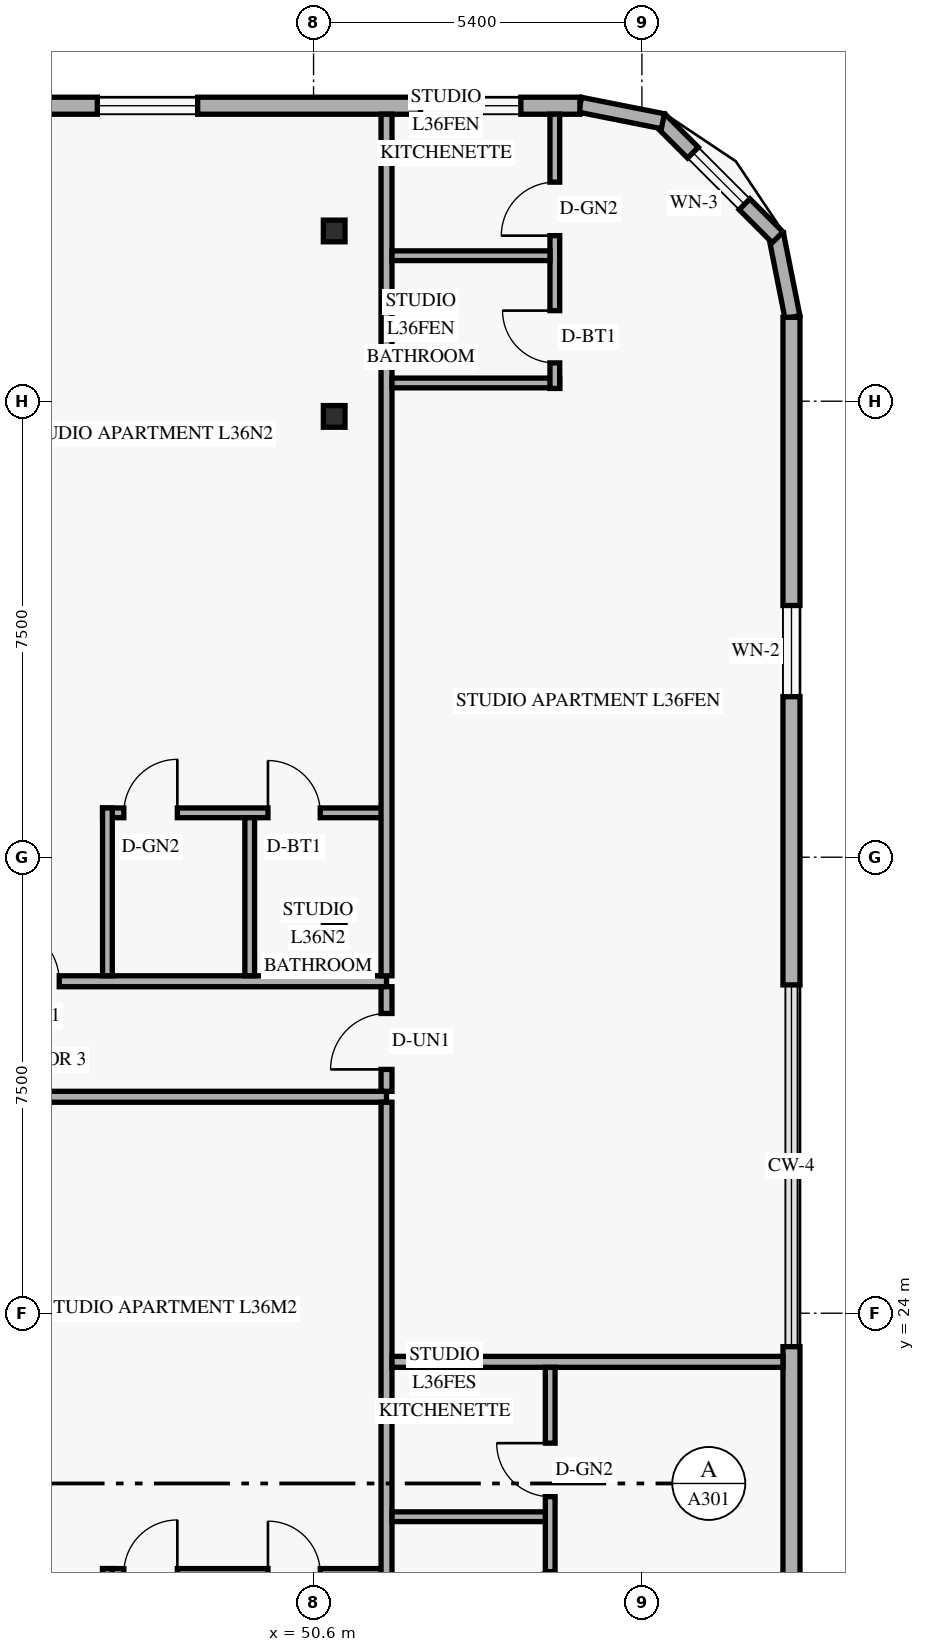
"""IFC4 building model, lengths in metres.
Left out: names, types, materials, properties, quantities, classifications, styles, units other than length and angle.
Written with IfcOpenShell. Run it as: python <this file> out.ifc"""

import sys

from ifc_helpers import new_model, si_unit, direction, frame, frame_2d, origin, origin_2d, place, context, subcontext, project, spatial, rectangle, hollow_rectangle, extrude, element, fill, save


model = new_model("IFC4")
c1 = context("Model", 3, precision=1e-05, world=origin(), true_north=direction((0.0, 1.0)))
c2 = subcontext(c1, "Body", "Model", "MODEL_VIEW")
j1 = project(units=[si_unit("LENGTHUNIT", "METRE"), si_unit("PLANEANGLEUNIT", "RADIAN")], contexts=[c1])
p1 = place(None, origin())
s1 = spatial("IfcSite", under=j1, at=p1, CompositionType="ELEMENT")
p2 = place(p1, origin())
s2 = spatial("IfcBuilding", under=s1, at=p2, CompositionType="ELEMENT")
p3 = place(p2, frame((0.0, 0.0, 141.0)))
s3 = spatial("IfcBuildingStorey", under=s2, at=p3, CompositionType="ELEMENT", Elevation=141.0)
for number, where, z_axis, x_axis in (
    (1, (50.835, 30.2, 0.0), (0.058, 0.0, 0.998), (0.0, 1.0, 0.0)),
    (2, (50.835, 38.75, 0.0), (0.058, 0.0, 0.998), (0.0, 1.0, 0.0)),
    (3, (50.835, 41.8, 0.0), (0.058, 0.0, 0.998), (0.0, 1.0, 0.0)),
):
    element("IfcColumn", number, at=place(p3, frame(where, z_axis=z_axis, x_axis=x_axis)), inside=s3, PredefinedType="COLUMN", context=c2, shape_type="SweptSolid", body=[
        extrude(hollow_rectangle(XDim=0.356, YDim=0.356, WallThickness=0.016, at=origin_2d()), origin(), (0.0, 0.0, 1.0), 3.606),
    ])
p4 = place(p3, frame((58.476, 40.384, 0.0), z_axis=(0.0, 0.0, 1.0), x_axis=(-0.19496651342, 0.980809899341, 0.0)))
e4 = element("IfcWall", 4, at=p4, inside=s3, PredefinedType="SOLIDWALL", context=c2, shape_type="SweptSolid", body=[
    extrude(rectangle(XDim=1.389, YDim=0.25, at=frame_2d((0.694, 0.0))), origin(), (0.0, 0.0, 1.0), 3.36),
])
p5 = place(p3, frame((58.232, 41.695, 0.0), z_axis=(0.0, 0.0, 1.0), x_axis=(-0.707106781187, 0.707106781187, 0.0)))
e5 = element("IfcWall", 5, at=p5, inside=s3, PredefinedType="SOLIDWALL", context=c2, shape_type="SweptSolid", body=[
    extrude(rectangle(XDim=2.739, YDim=0.25, at=frame_2d((1.37, 0.0))), origin(), (0.0, 0.0, 1.0), 3.36),
])
p6 = place(p5, frame((0.77, 0.0, 0.85)))
e6 = element("IfcOpeningElement", 6, at=p6, cuts=e5, PredefinedType="OPENING", context=c2, shape_type="SweptSolid", body=[
    extrude(rectangle(XDim=1.2, YDim=1.5, at=frame_2d((0.6, 0.75))), frame((0.0, 0.135, 0.0), z_axis=(0.0, -1.0, 0.0), x_axis=(1.0, 0.0, 0.0)), (0.0, 0.0, 1.0), 0.27),
])
p7 = place(p3, frame((56.345, 43.605, 0.0), z_axis=(0.0, 0.0, 1.0), x_axis=(-0.980809899341, 0.19496651342, 0.0)))
e7 = element("IfcWall", 7, at=p7, inside=s3, PredefinedType="SOLIDWALL", context=c2, shape_type="SweptSolid", body=[
    extrude(rectangle(XDim=1.389, YDim=0.25, at=frame_2d((0.694, 0.0))), origin(), (0.0, 0.0, 1.0), 3.36),
])
p8 = place(p3, frame((58.46, 7.62, 0.0), z_axis=(0.0, 0.0, 1.0), x_axis=(0.0, 1.0, 0.0)))
e8 = element("IfcWall", 8, at=p8, inside=s3, PredefinedType="SOLIDWALL", context=c2, shape_type="SweptSolid", body=[
    extrude(rectangle(XDim=15.83, YDim=0.28, at=frame_2d((7.915, 0.0))), origin(), (0.0, 0.0, 1.0), 3.36),
])
p9 = place(p8, frame((7.165, 0.0, 0.85)))
e9 = element("IfcOpeningElement", 9, at=p9, cuts=e8, PredefinedType="OPENING", context=c2, shape_type="SweptSolid", body=[
    extrude(rectangle(XDim=1.5, YDim=1.55, at=frame_2d((0.75, 0.775))), frame((0.0, 0.15, 0.0), z_axis=(0.0, -1.0, 0.0), x_axis=(1.0, 0.0, 0.0)), (0.0, 0.0, 1.0), 0.3),
])
p10 = place(p3, frame((58.46, 29.4, 0.0), z_axis=(0.0, 0.0, 1.0), x_axis=(0.0, 1.0, 0.0)))
e10 = element("IfcWall", 10, at=p10, inside=s3, PredefinedType="SOLIDWALL", context=c2, shape_type="SweptSolid", body=[
    extrude(rectangle(XDim=10.98, YDim=0.28, at=frame_2d((5.49, 0.0))), origin(), (0.0, 0.0, 1.0), 3.36),
])
p11 = place(p10, frame((4.74, 0.0, 0.85)))
e11 = element("IfcOpeningElement", 11, at=p11, cuts=e10, PredefinedType="OPENING", context=c2, shape_type="SweptSolid", body=[
    extrude(rectangle(XDim=1.5, YDim=1.55, at=frame_2d((0.75, 0.775))), frame((0.0, 0.15, 0.0), z_axis=(0.0, -1.0, 0.0), x_axis=(1.0, 0.0, 0.0)), (0.0, 0.0, 1.0), 0.3),
])
p12 = place(p3, frame((54.98, 43.86, 0.0), z_axis=(0.0, 0.0, 1.0), x_axis=(-1.0, 0.0, 0.0)))
e12 = element("IfcWall", 12, at=p12, inside=s3, PredefinedType="SOLIDWALL", context=c2, shape_type="SweptSolid", body=[
    extrude(rectangle(XDim=33.76, YDim=0.28, at=frame_2d((16.88, 0.0))), origin(), (0.0, 0.0, 1.0), 3.36),
])
p13 = place(p12, frame((28.555, 0.0, 0.85)))
e13 = element("IfcOpeningElement", 13, at=p13, cuts=e12, PredefinedType="OPENING", context=c2, shape_type="SweptSolid", body=[
    extrude(rectangle(XDim=1.65, YDim=1.6, at=frame_2d((0.825, 0.8))), frame((0.0, 0.15, 0.0), z_axis=(0.0, -1.0, 0.0), x_axis=(1.0, 0.0, 0.0)), (0.0, 0.0, 1.0), 0.3),
])
p14 = place(p12, frame((21.67, 0.0, 0.85)))
e14 = element("IfcOpeningElement", 14, at=p14, cuts=e12, PredefinedType="OPENING", context=c2, shape_type="SweptSolid", body=[
    extrude(rectangle(XDim=1.65, YDim=1.6, at=frame_2d((0.825, 0.8))), frame((0.0, 0.15, 0.0), z_axis=(0.0, -1.0, 0.0), x_axis=(1.0, 0.0, 0.0)), (0.0, 0.0, 1.0), 0.3),
])
p15 = place(p12, frame((14.476, 0.0, 0.85)))
e15 = element("IfcOpeningElement", 15, at=p15, cuts=e12, PredefinedType="OPENING", context=c2, shape_type="SweptSolid", body=[
    extrude(rectangle(XDim=1.65, YDim=1.6, at=frame_2d((0.825, 0.8))), frame((0.0, 0.15, 0.0), z_axis=(0.0, -1.0, 0.0), x_axis=(1.0, 0.0, 0.0)), (0.0, 0.0, 1.0), 0.3),
])
p16 = place(p12, frame((6.286, 0.0, 0.85)))
e16 = element("IfcOpeningElement", 16, at=p16, cuts=e12, PredefinedType="OPENING", context=c2, shape_type="SweptSolid", body=[
    extrude(rectangle(XDim=1.65, YDim=1.6, at=frame_2d((0.825, 0.8))), frame((0.0, 0.15, 0.0), z_axis=(0.0, -1.0, 0.0), x_axis=(1.0, 0.0, 0.0)), (0.0, 0.0, 1.0), 0.3),
])
p17 = place(p12, frame((0.971, 0.0, 0.85)))
e17 = element("IfcOpeningElement", 17, at=p17, cuts=e12, PredefinedType="OPENING", context=c2, shape_type="SweptSolid", body=[
    extrude(rectangle(XDim=1.65, YDim=1.6, at=frame_2d((0.825, 0.8))), frame((0.0, 0.15, 0.0), z_axis=(0.0, -1.0, 0.0), x_axis=(1.0, 0.0, 0.0)), (0.0, 0.0, 1.0), 0.3),
])
p18 = place(p3, frame((37.64, 27.56, 0.0), z_axis=(0.0, 0.0, 1.0), x_axis=(1.0, 0.0, 0.0)))
e18 = element("IfcWall", 18, at=p18, inside=s3, PredefinedType="STANDARD", context=c2, shape_type="SweptSolid", body=[
    extrude(rectangle(XDim=14.16, YDim=0.18, at=frame_2d((7.08, 0.0))), origin(), (0.0, 0.0, 1.0), 2.73),
])
p19 = place(p3, frame((35.51, 29.46, 0.0), z_axis=(0.0, 0.0, 1.0), x_axis=(1.0, 0.0, 0.0)))
e19 = element("IfcWall", 19, at=p19, inside=s3, PredefinedType="STANDARD", context=c2, shape_type="SweptSolid", body=[
    extrude(rectangle(XDim=16.29, YDim=0.18, at=frame_2d((8.145, 0.0))), origin(), (0.0, 0.0, 1.0), 2.73),
])
p20 = place(p19, frame((0.35, 0.0, 0.0)))
e20 = element("IfcOpeningElement", 20, at=p20, cuts=e19, PredefinedType="OPENING", context=c2, shape_type="SweptSolid", body=[
    extrude(rectangle(XDim=0.92, YDim=2.15, at=frame_2d((0.46, 1.075))), frame((0.0, 0.1, 0.0), z_axis=(0.0, -1.0, 0.0), x_axis=(1.0, 0.0, 0.0)), (0.0, 0.0, 1.0), 0.2),
])
p21 = place(p19, frame((9.988, 0.0, 0.0)))
e21 = element("IfcOpeningElement", 21, at=p21, cuts=e19, PredefinedType="OPENING", context=c2, shape_type="SweptSolid", body=[
    extrude(rectangle(XDim=0.92, YDim=2.15, at=frame_2d((0.46, 1.075))), frame((0.0, 0.1, 0.0), z_axis=(0.0, -1.0, 0.0), x_axis=(1.0, 0.0, 0.0)), (0.0, 0.0, 1.0), 0.2),
])
p22 = place(p3, frame((47.13, 32.23, 0.0), z_axis=(0.0, 0.0, 1.0), x_axis=(1.0, 0.0, 0.0)))
e22 = element("IfcWall", 22, at=p22, inside=s3, PredefinedType="PLUMBINGWALL", context=c2, shape_type="SweptSolid", body=[
    extrude(rectangle(XDim=4.67, YDim=0.16, at=frame_2d((2.335, 0.0))), origin(), (0.0, 0.0, 1.0), 2.879),
])
p23 = place(p22, frame((0.35, 0.0, 0.0)))
e23 = element("IfcOpeningElement", 23, at=p23, cuts=e22, PredefinedType="OPENING", context=c2, shape_type="SweptSolid", body=[
    extrude(rectangle(XDim=0.88, YDim=2.12, at=frame_2d((0.44, 1.06))), frame((0.0, 0.09, 0.0), z_axis=(0.0, -1.0, 0.0), x_axis=(1.0, 0.0, 0.0)), (0.0, 0.0, 1.0), 0.18),
])
p24 = place(p22, frame((2.72, 0.0, 0.0)))
e24 = element("IfcOpeningElement", 24, at=p24, cuts=e22, PredefinedType="OPENING", context=c2, shape_type="SweptSolid", body=[
    extrude(rectangle(XDim=0.86, YDim=2.12, at=frame_2d((0.43, 1.06))), frame((0.0, 0.09, 0.0), z_axis=(0.0, -1.0, 0.0), x_axis=(1.0, 0.0, 0.0)), (0.0, 0.0, 1.0), 0.18),
])
p25 = place(p3, frame((47.21, 29.55, 0.0), z_axis=(0.0, 0.0, 1.0), x_axis=(0.0, 1.0, 0.0)))
e25 = element("IfcWall", 25, at=p25, inside=s3, PredefinedType="PLUMBINGWALL", context=c2, shape_type="SweptSolid", body=[
    extrude(rectangle(XDim=2.76, YDim=0.16, at=frame_2d((1.38, 0.0))), origin(), (0.0, 0.0, 1.0), 2.73),
])
p26 = place(p3, frame((49.55, 29.55, 0.0), z_axis=(0.0, 0.0, 1.0), x_axis=(0.0, 1.0, 0.0)))
e26 = element("IfcWall", 26, at=p26, inside=s3, PredefinedType="PLUMBINGWALL", context=c2, shape_type="SweptSolid", body=[
    extrude(rectangle(XDim=2.6, YDim=0.16, at=frame_2d((1.3, 0.0))), origin(), (0.0, 0.0, 1.0), 2.73),
])
p27 = place(p3, frame((47.13, 19.72, 0.0), z_axis=(0.0, 0.0, 1.0), x_axis=(1.0, 0.0, 0.0)))
e27 = element("IfcWall", 27, at=p27, inside=s3, PredefinedType="PLUMBINGWALL", context=c2, shape_type="SweptSolid", body=[
    extrude(rectangle(XDim=4.67, YDim=0.16, at=frame_2d((2.335, 0.0))), origin(), (0.0, 0.0, 1.0), 2.879),
])
p28 = place(p27, frame((0.35, 0.0, 0.0)))
e28 = element("IfcOpeningElement", 28, at=p28, cuts=e27, PredefinedType="OPENING", context=c2, shape_type="SweptSolid", body=[
    extrude(rectangle(XDim=0.88, YDim=2.12, at=frame_2d((0.44, 1.06))), frame((0.0, 0.09, 0.0), z_axis=(0.0, -1.0, 0.0), x_axis=(1.0, 0.0, 0.0)), (0.0, 0.0, 1.0), 0.18),
])
p29 = place(p27, frame((2.72, 0.0, 0.0)))
e29 = element("IfcOpeningElement", 29, at=p29, cuts=e27, PredefinedType="OPENING", context=c2, shape_type="SweptSolid", body=[
    extrude(rectangle(XDim=0.86, YDim=2.12, at=frame_2d((0.43, 1.06))), frame((0.0, 0.09, 0.0), z_axis=(0.0, -1.0, 0.0), x_axis=(1.0, 0.0, 0.0)), (0.0, 0.0, 1.0), 0.18),
])
p30 = place(p3, frame((47.21, 17.37, 0.0), z_axis=(0.0, 0.0, 1.0), x_axis=(0.0, 1.0, 0.0)))
e30 = element("IfcWall", 30, at=p30, inside=s3, PredefinedType="PLUMBINGWALL", context=c2, shape_type="SweptSolid", body=[
    extrude(rectangle(XDim=2.43, YDim=0.16, at=frame_2d((1.215, 0.0))), origin(), (0.0, 0.0, 1.0), 2.73),
])
p31 = place(p3, frame((51.8, 27.65, 0.0), z_axis=(0.0, 0.0, 1.0), x_axis=(0.0, 1.0, 0.0)))
e31 = element("IfcWall", 31, at=p31, inside=s3, PredefinedType="STANDARD", context=c2, shape_type="SweptSolid", body=[
    extrude(rectangle(XDim=1.72, YDim=0.18, at=frame_2d((0.86, 0.0))), origin(), (0.0, 0.0, 1.0), 3.36),
])
p32 = place(p31, frame((0.36, 0.0, 0.0)))
e32 = element("IfcOpeningElement", 32, at=p32, cuts=e31, PredefinedType="OPENING", context=c2, shape_type="SweptSolid", body=[
    extrude(rectangle(XDim=0.92, YDim=2.15, at=frame_2d((0.46, 1.075))), frame((0.0, 0.1, 0.0), z_axis=(0.0, -1.0, 0.0), x_axis=(1.0, 0.0, 0.0)), (0.0, 0.0, 1.0), 0.2),
])
p33 = place(p3, frame((51.8, 17.37, 0.0), z_axis=(0.0, 0.0, 1.0), x_axis=(0.0, 1.0, 0.0)))
e33 = element("IfcWall", 33, at=p33, inside=s3, PredefinedType="PARTITIONING", context=c2, shape_type="SweptSolid", body=[
    extrude(rectangle(XDim=10.1, YDim=0.18, at=frame_2d((5.05, 0.0))), origin(), (0.0, 0.0, 1.0), 3.36),
])
p34 = place(p3, frame((51.8, 29.55, 0.0), z_axis=(0.0, 0.0, 1.0), x_axis=(0.0, 1.0, 0.0)))
e34 = element("IfcWall", 34, at=p34, inside=s3, PredefinedType="PARTITIONING", context=c2, shape_type="SweptSolid", body=[
    extrude(rectangle(XDim=14.17, YDim=0.18, at=frame_2d((7.085, 0.0))), origin(), (0.0, 0.0, 1.0), 3.36),
])
p35 = place(p3, frame((51.89, 23.2, 0.0), z_axis=(0.0, 0.0, 1.0), x_axis=(1.0, 0.0, 0.0)))
e35 = element("IfcWall", 35, at=p35, inside=s3, PredefinedType="PARTITIONING", context=c2, shape_type="SweptSolid", body=[
    extrude(rectangle(XDim=6.43, YDim=0.18, at=frame_2d((3.215, 0.0))), origin(), (0.0, 0.0, 1.0), 3.36),
])
p36 = place(p3, frame((54.492, 18.47, 0.0), z_axis=(0.0, 0.0, 1.0), x_axis=(0.0, 1.0, 0.0)))
e36 = element("IfcWall", 36, at=p36, inside=s3, PredefinedType="PLUMBINGWALL", context=c2, shape_type="SweptSolid", body=[
    extrude(rectangle(XDim=4.64, YDim=0.16, at=frame_2d((2.32, 0.0))), origin(), (0.0, 0.0, 1.0), 3.36),
])
p37 = place(p36, frame((0.42, 0.0, 0.0)))
e37 = element("IfcOpeningElement", 37, at=p37, cuts=e36, PredefinedType="OPENING", context=c2, shape_type="SweptSolid", body=[
    extrude(rectangle(XDim=0.86, YDim=2.12, at=frame_2d((0.43, 1.06))), frame((0.0, 0.09, 0.0), z_axis=(0.0, -1.0, 0.0), x_axis=(1.0, 0.0, 0.0)), (0.0, 0.0, 1.0), 0.18),
])
p38 = place(p36, frame((2.513, 0.0, 0.0)))
e38 = element("IfcOpeningElement", 38, at=p38, cuts=e36, PredefinedType="OPENING", context=c2, shape_type="SweptSolid", body=[
    extrude(rectangle(XDim=0.88, YDim=2.12, at=frame_2d((0.44, 1.06))), frame((0.0, 0.09, 0.0), z_axis=(0.0, -1.0, 0.0), x_axis=(1.0, 0.0, 0.0)), (0.0, 0.0, 1.0), 0.18),
])
p39 = place(p3, frame((51.89, 20.653, 0.0), z_axis=(0.0, 0.0, 1.0), x_axis=(1.0, 0.0, 0.0)))
e39 = element("IfcWall", 39, at=p39, inside=s3, PredefinedType="PLUMBINGWALL", context=c2, shape_type="SweptSolid", body=[
    extrude(rectangle(XDim=2.522, YDim=0.16, at=frame_2d((1.261, 0.0))), origin(), (0.0, 0.0, 1.0), 3.36),
])
p40 = place(p3, frame((51.89, 39.3, 0.0), z_axis=(0.0, 0.0, 1.0), x_axis=(1.0, 0.0, 0.0)))
e40 = element("IfcWall", 40, at=p40, inside=s3, PredefinedType="PLUMBINGWALL", context=c2, shape_type="SweptSolid", body=[
    extrude(rectangle(XDim=2.758, YDim=0.16, at=frame_2d((1.379, 0.0))), origin(), (0.0, 0.0, 1.0), 3.36),
])
p41 = place(p3, frame((54.568, 39.21, 0.0), z_axis=(0.0, 0.0, 1.0), x_axis=(0.0, 1.0, 0.0)))
e41 = element("IfcWall", 41, at=p41, inside=s3, PredefinedType="PLUMBINGWALL", context=c2, shape_type="SweptSolid", body=[
    extrude(rectangle(XDim=4.51, YDim=0.16, at=frame_2d((2.255, 0.0))), origin(), (0.0, 0.0, 1.0), 3.36),
])
p42 = place(p41, frame((0.42, 0.0, 0.0)))
e42 = element("IfcOpeningElement", 42, at=p42, cuts=e41, PredefinedType="OPENING", context=c2, shape_type="SweptSolid", body=[
    extrude(rectangle(XDim=0.86, YDim=2.12, at=frame_2d((0.43, 1.06))), frame((0.0, 0.09, 0.0), z_axis=(0.0, -1.0, 0.0), x_axis=(1.0, 0.0, 0.0)), (0.0, 0.0, 1.0), 0.18),
])
p43 = place(p41, frame((2.513, 0.0, 0.0)))
e43 = element("IfcOpeningElement", 43, at=p43, cuts=e41, PredefinedType="OPENING", context=c2, shape_type="SweptSolid", body=[
    extrude(rectangle(XDim=0.88, YDim=2.12, at=frame_2d((0.44, 1.06))), frame((0.0, 0.09, 0.0), z_axis=(0.0, -1.0, 0.0), x_axis=(1.0, 0.0, 0.0)), (0.0, 0.0, 1.0), 0.18),
])
p44 = place(p3, frame((51.89, 41.393, 0.0), z_axis=(0.0, 0.0, 1.0), x_axis=(1.0, 0.0, 0.0)))
e44 = element("IfcWall", 44, at=p44, inside=s3, PredefinedType="PLUMBINGWALL", context=c2, shape_type="SweptSolid", body=[
    extrude(rectangle(XDim=2.598, YDim=0.16, at=frame_2d((1.299, 0.0))), origin(), (0.0, 0.0, 1.0), 3.36),
])
p45 = place(p6, origin())
e45 = element("IfcWindow", 45, at=p45, inside=s3, PartitioningType="SINGLE_PANEL", PredefinedType="WINDOW", context=c2, shape_type="SweptSolid", body=[
    extrude(rectangle(XDim=1.2, YDim=1.5, at=frame_2d((0.6, 0.75))), frame((0.0, 0.03, 0.0), z_axis=(0.0, -1.0, 0.0), x_axis=(1.0, 0.0, 0.0)), (0.0, 0.0, 1.0), 0.06),
])
fill(e6, e45)
p46 = place(p11, origin())
e46 = element("IfcWindow", 46, at=p46, inside=s3, PartitioningType="SINGLE_PANEL", PredefinedType="WINDOW", context=c2, shape_type="SweptSolid", body=[
    extrude(rectangle(XDim=1.5, YDim=1.55, at=frame_2d((0.75, 0.775))), frame((0.0, 0.03, 0.0), z_axis=(0.0, -1.0, 0.0), x_axis=(1.0, 0.0, 0.0)), (0.0, 0.0, 1.0), 0.06),
])
fill(e11, e46)
p47 = place(p16, origin())
e47 = element("IfcWindow", 47, at=p47, inside=s3, PartitioningType="SINGLE_PANEL", PredefinedType="WINDOW", context=c2, shape_type="SweptSolid", body=[
    extrude(rectangle(XDim=1.65, YDim=1.6, at=frame_2d((0.825, 0.8))), frame((0.0, 0.03, 0.0), z_axis=(0.0, -1.0, 0.0), x_axis=(1.0, 0.0, 0.0)), (0.0, 0.0, 1.0), 0.06),
])
fill(e16, e47)
p48 = place(p17, origin())
e48 = element("IfcWindow", 48, at=p48, inside=s3, PartitioningType="SINGLE_PANEL", PredefinedType="WINDOW", context=c2, shape_type="SweptSolid", body=[
    extrude(rectangle(XDim=1.65, YDim=1.6, at=frame_2d((0.825, 0.8))), frame((0.0, 0.03, 0.0), z_axis=(0.0, -1.0, 0.0), x_axis=(1.0, 0.0, 0.0)), (0.0, 0.0, 1.0), 0.06),
])
fill(e17, e48)
p49 = place(p21, origin())
e49 = element("IfcDoor", 49, at=p49, inside=s3, OperationType="SINGLE_SWING_LEFT", PredefinedType="DOOR", context=c2, shape_type="SweptSolid", body=[
    extrude(rectangle(XDim=0.92, YDim=2.15, at=frame_2d((0.46, 1.075))), frame((0.0, 0.025, 0.0), z_axis=(0.0, -1.0, 0.0), x_axis=(1.0, 0.0, 0.0)), (0.0, 0.0, 1.0), 0.05),
])
fill(e21, e49)
p50 = place(p23, origin())
e50 = element("IfcDoor", 50, at=p50, inside=s3, OperationType="SINGLE_SWING_RIGHT", PredefinedType="DOOR", context=c2, shape_type="SweptSolid", body=[
    extrude(rectangle(XDim=0.88, YDim=2.12, at=frame_2d((0.44, 1.06))), frame((0.0, 0.025, 0.0), z_axis=(0.0, -1.0, 0.0), x_axis=(1.0, 0.0, 0.0)), (0.0, 0.0, 1.0), 0.05),
])
fill(e23, e50)
p51 = place(p24, origin())
e51 = element("IfcDoor", 51, at=p51, inside=s3, OperationType="SINGLE_SWING_LEFT", PredefinedType="DOOR", context=c2, shape_type="SweptSolid", body=[
    extrude(rectangle(XDim=0.86, YDim=2.12, at=frame_2d((0.43, 1.06))), frame((0.0, 0.025, 0.0), z_axis=(0.0, -1.0, 0.0), x_axis=(1.0, 0.0, 0.0)), (0.0, 0.0, 1.0), 0.05),
])
fill(e24, e51)
p52 = place(p28, origin())
e52 = element("IfcDoor", 52, at=p52, inside=s3, OperationType="SINGLE_SWING_RIGHT", PredefinedType="DOOR", context=c2, shape_type="SweptSolid", body=[
    extrude(rectangle(XDim=0.88, YDim=2.12, at=frame_2d((0.44, 1.06))), frame((0.0, 0.025, 0.0), z_axis=(0.0, -1.0, 0.0), x_axis=(1.0, 0.0, 0.0)), (0.0, 0.0, 1.0), 0.05),
])
fill(e28, e52)
p53 = place(p29, origin())
e53 = element("IfcDoor", 53, at=p53, inside=s3, OperationType="SINGLE_SWING_LEFT", PredefinedType="DOOR", context=c2, shape_type="SweptSolid", body=[
    extrude(rectangle(XDim=0.86, YDim=2.12, at=frame_2d((0.43, 1.06))), frame((0.0, 0.025, 0.0), z_axis=(0.0, -1.0, 0.0), x_axis=(1.0, 0.0, 0.0)), (0.0, 0.0, 1.0), 0.05),
])
fill(e29, e53)
p54 = place(p37, origin())
e54 = element("IfcDoor", 54, at=p54, inside=s3, OperationType="SINGLE_SWING_LEFT", PredefinedType="DOOR", context=c2, shape_type="SweptSolid", body=[
    extrude(rectangle(XDim=0.86, YDim=2.12, at=frame_2d((0.43, 1.06))), frame((0.0, 0.025, 0.0), z_axis=(0.0, -1.0, 0.0), x_axis=(1.0, 0.0, 0.0)), (0.0, 0.0, 1.0), 0.05),
])
fill(e37, e54)
p55 = place(p38, origin())
e55 = element("IfcDoor", 55, at=p55, inside=s3, OperationType="SINGLE_SWING_RIGHT", PredefinedType="DOOR", context=c2, shape_type="SweptSolid", body=[
    extrude(rectangle(XDim=0.88, YDim=2.12, at=frame_2d((0.44, 1.06))), frame((0.0, 0.025, 0.0), z_axis=(0.0, -1.0, 0.0), x_axis=(1.0, 0.0, 0.0)), (0.0, 0.0, 1.0), 0.05),
])
fill(e38, e55)
p56 = place(p32, origin())
e56 = element("IfcDoor", 56, at=p56, inside=s3, OperationType="SINGLE_SWING_LEFT", PredefinedType="DOOR", context=c2, shape_type="SweptSolid", body=[
    extrude(rectangle(XDim=0.92, YDim=2.15, at=frame_2d((0.46, 1.075))), frame((0.0, 0.025, 0.0), z_axis=(0.0, -1.0, 0.0), x_axis=(1.0, 0.0, 0.0)), (0.0, 0.0, 1.0), 0.05),
])
fill(e32, e56)
p57 = place(p42, origin())
e57 = element("IfcDoor", 57, at=p57, inside=s3, OperationType="SINGLE_SWING_RIGHT", PredefinedType="DOOR", context=c2, shape_type="SweptSolid", body=[
    extrude(rectangle(XDim=0.86, YDim=2.12, at=frame_2d((0.43, 1.06))), frame((0.0, 0.025, 0.0), z_axis=(0.0, -1.0, 0.0), x_axis=(1.0, 0.0, 0.0)), (0.0, 0.0, 1.0), 0.05),
])
fill(e42, e57)
p58 = place(p43, origin())
e58 = element("IfcDoor", 58, at=p58, inside=s3, OperationType="SINGLE_SWING_LEFT", PredefinedType="DOOR", context=c2, shape_type="SweptSolid", body=[
    extrude(rectangle(XDim=0.88, YDim=2.12, at=frame_2d((0.44, 1.06))), frame((0.0, 0.025, 0.0), z_axis=(0.0, -1.0, 0.0), x_axis=(1.0, 0.0, 0.0)), (0.0, 0.0, 1.0), 0.05),
])
fill(e43, e58)
save(model, sys.argv[1])
